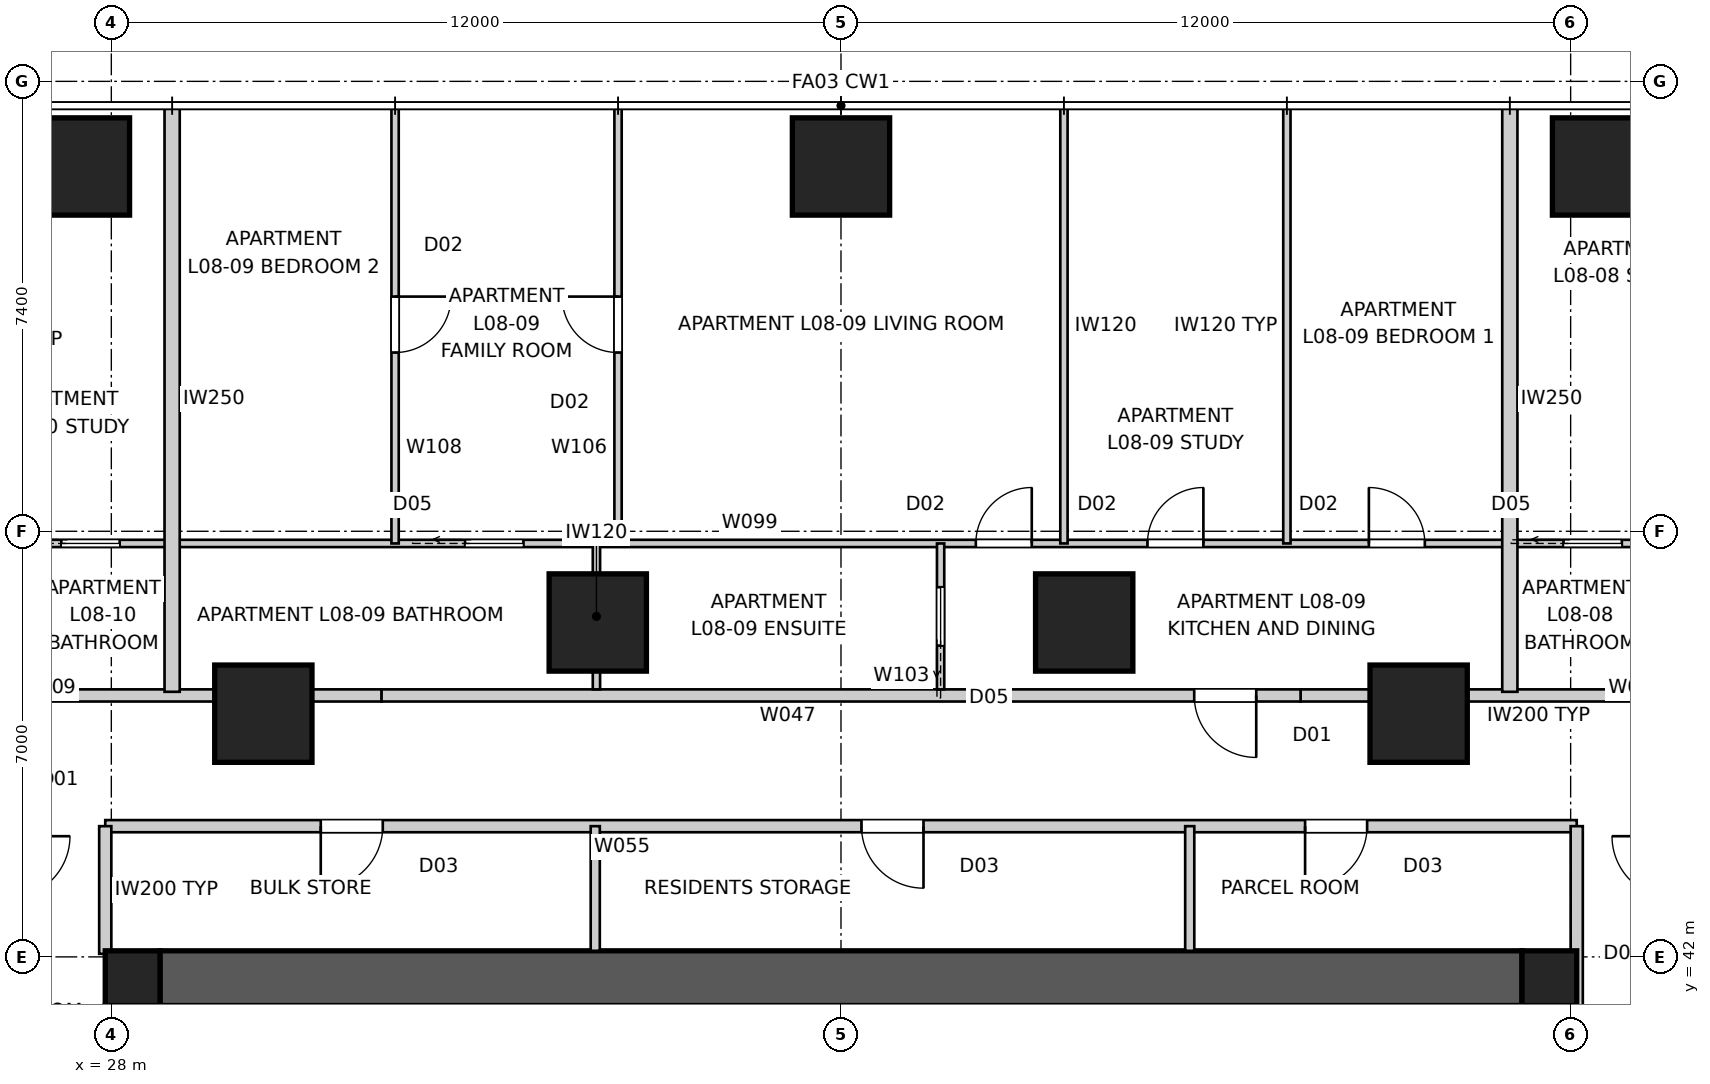
"""IFC4 building model, lengths in metres.
Left out: names, types, materials, properties, quantities, classifications, styles, units other than length and angle.
Written with IfcOpenShell. Run it as: python <this file> out.ifc"""

import sys

from ifc_helpers import new_model, si_unit, direction, frame, frame_2d, origin, origin_2d, place, context, subcontext, project, spatial, polyline, rectangle, outline, extrude, element, fill, save


model = new_model("IFC4")
c1 = context("Model", 3, precision=1e-05, world=origin(), true_north=direction((0.0, 1.0)))
c2 = subcontext(c1, "Body", "Model", "MODEL_VIEW")
j1 = project(units=[si_unit("LENGTHUNIT", "METRE"), si_unit("PLANEANGLEUNIT", "RADIAN")], contexts=[c1])
p1 = place(None, origin())
s1 = spatial("IfcSite", under=j1, at=p1, CompositionType="ELEMENT")
p2 = place(p1, origin())
s2 = spatial("IfcBuilding", under=s1, at=p2, CompositionType="ELEMENT")
p3 = place(p2, frame((0.0, 0.0, 32.0)))
s3 = spatial("IfcBuildingStorey", under=s2, at=p3, CompositionType="ELEMENT", Elevation=32.0)
p4 = place(p3, frame((28.8, 41.65, 0.0), z_axis=(0.0, 0.0, 1.0), x_axis=(1.0, 0.0, 0.0)))
e1 = element("IfcWall", 1, at=p4, inside=s3, PredefinedType="SHEAR", context=c2, shape_type="SweptSolid", body=[
    extrude(outline(polyline([(0.0, -0.45), (22.4, -0.45), (22.4, -0.025), (22.85, -0.025), (22.85, 0.025), (22.4, 0.025), (22.4, 0.45), (0.0, 0.45), (0.0, 0.025), (-0.45, 0.025), (-0.45, -0.025), (0.0, -0.025), (0.0, -0.45)])), origin(), (0.0, 0.0, 1.0), 3.4),
])
p5 = place(p3, frame((51.65, 18.8, 0.0), z_axis=(0.0, 0.0, 1.0), x_axis=(0.0, 1.0, 0.0)))
e2 = element("IfcWall", 2, at=p5, inside=s3, PredefinedType="SHEAR", context=c2, shape_type="SweptSolid", body=[
    extrude(outline(polyline([(0.0, -0.45), (22.4, -0.45), (22.4, -0.025), (22.85, -0.025), (22.85, 0.025), (22.4, 0.025), (22.4, 0.45), (0.0, 0.45), (0.0, 0.025), (-0.45, 0.025), (-0.45, -0.025), (0.0, -0.025), (0.0, -0.45)])), origin(), (0.0, 0.0, 1.0), 3.4),
])
p6 = place(p5, frame((11.14, 0.0, 0.0)))
e3 = element("IfcOpeningElement", 3, at=p6, cuts=e2, PredefinedType="OPENING", context=c2, shape_type="SweptSolid", body=[
    extrude(rectangle(XDim=1.02, YDim=2.4, at=frame_2d((0.51, 1.2))), frame((0.0, 0.46, 0.0), z_axis=(0.0, -1.0, 0.0), x_axis=(1.0, 0.0, 0.0)), (0.0, 0.0, 1.0), 0.92),
])
p7 = place(p3, frame((28.35, 41.2, 0.0), z_axis=(0.0, 0.0, 1.0), x_axis=(0.0, -1.0, 0.0)))
e4 = element("IfcWall", 4, at=p7, inside=s3, PredefinedType="SHEAR", context=c2, shape_type="SweptSolid", body=[
    extrude(outline(polyline([(0.0, -0.45), (22.4, -0.45), (22.4, -0.025), (22.85, -0.025), (22.85, 0.025), (22.4, 0.025), (22.4, 0.45), (0.0, 0.45), (0.0, 0.025), (-0.45, 0.025), (-0.45, -0.025), (0.0, -0.025), (0.0, -0.45)])), origin(), (0.0, 0.0, 1.0), 3.4),
])
p8 = place(p7, frame((11.14, 0.0, 0.0)))
e5 = element("IfcOpeningElement", 5, at=p8, cuts=e4, PredefinedType="OPENING", context=c2, shape_type="SweptSolid", body=[
    extrude(rectangle(XDim=1.02, YDim=2.4, at=frame_2d((0.51, 1.2))), frame((0.0, 0.46, 0.0), z_axis=(0.0, -1.0, 0.0), x_axis=(1.0, 0.0, 0.0)), (0.0, 0.0, 1.0), 0.92),
])
for number, where, z_axis, x_axis in (
    (6, (51.65, 41.65, 0.0), (0.0, 0.0, 1.0), (1.0, 0.0, 0.0)),
    (7, (28.35, 41.65, 0.0), (0.0, 0.0, 1.0), (1.0, 0.0, 0.0)),
):
    element("IfcColumn", number, at=place(p3, frame(where, z_axis=z_axis, x_axis=x_axis)), inside=s3, PredefinedType="COLUMN", context=c2, shape_type="SweptSolid", body=[
        extrude(rectangle(XDim=0.9, YDim=0.9, at=origin_2d()), origin(), (0.0, 0.0, 1.0), 3.4),
    ])
for number, where, z_axis, x_axis in (
    (8, (52.5, 55.0, 0.0), (0.0, 0.0, 1.0), (1.0, 0.0, 0.0)),
    (9, (40.0, 55.0, 0.0), (0.0, 0.0, 1.0), (1.0, 0.0, 0.0)),
    (10, (27.5, 55.0, 0.0), (0.0, 0.0, 1.0), (1.0, 0.0, 0.0)),
    (11, (49.5, 46.0, 0.0), (0.0, 0.0, 1.0), (1.0, 0.0, 0.0)),
    (12, (44.0, 47.5, 0.0), (0.0, 0.0, 1.0), (1.0, 0.0, 0.0)),
    (13, (36.0, 47.5, 0.0), (0.0, 0.0, 1.0), (1.0, 0.0, 0.0)),
    (14, (30.5, 46.0, 0.0), (0.0, 0.0, 1.0), (1.0, 0.0, 0.0)),
):
    element("IfcColumn", number, at=place(p3, frame(where, z_axis=z_axis, x_axis=x_axis)), inside=s3, PredefinedType="COLUMN", context=c2, shape_type="SweptSolid", body=[
        extrude(rectangle(XDim=1.6, YDim=1.6, at=origin_2d()), origin(), (0.0, 0.0, 1.0), 3.4),
    ])
p9 = place(p3, frame((53.7, 46.3, 0.0), z_axis=(0.0, 0.0, 1.0), x_axis=(-1.0, 0.0, 0.0)))
e15 = element("IfcWall", 15, at=p9, inside=s3, PredefinedType="PARTITIONING", context=c2, shape_type="SweptSolid", body=[
    extrude(rectangle(XDim=4.458, YDim=0.2, at=frame_2d((2.229, 0.0))), origin(), (0.0, 0.0, 1.0), 3.25),
])
p10 = place(p3, frame((49.242, 46.3, 0.0), z_axis=(0.0, 0.0, 1.0), x_axis=(-1.0, 0.0, 0.0)))
e16 = element("IfcWall", 16, at=p10, inside=s3, PredefinedType="PARTITIONING", context=c2, shape_type="SweptSolid", body=[
    extrude(rectangle(XDim=1.683, YDim=0.2, at=frame_2d((0.842, 0.0))), origin(), (0.0, 0.0, 1.0), 2.55),
])
p11 = place(p3, frame((47.558, 46.3, 0.0), z_axis=(0.0, 0.0, 1.0), x_axis=(-1.0, 0.0, 0.0)))
e17 = element("IfcWall", 17, at=p11, inside=s3, PredefinedType="PARTITIONING", context=c2, shape_type="SweptSolid", body=[
    extrude(rectangle(XDim=15.117, YDim=0.2, at=frame_2d((7.558, 0.0))), origin(), (0.0, 0.0, 1.0), 3.25),
])
p12 = place(p11, frame((0.729, 0.0, 0.0)))
e18 = element("IfcOpeningElement", 18, at=p12, cuts=e17, PredefinedType="OPENING", context=c2, shape_type="SweptSolid", body=[
    extrude(rectangle(XDim=1.02, YDim=2.34, at=frame_2d((0.51, 1.17))), frame((0.0, 0.11, 0.0), z_axis=(0.0, -1.0, 0.0), x_axis=(1.0, 0.0, 0.0)), (0.0, 0.0, 1.0), 0.22),
])
p13 = place(p3, frame((32.442, 46.3, 0.0), z_axis=(0.0, 0.0, 1.0), x_axis=(-1.0, 0.0, 0.0)))
e19 = element("IfcWall", 19, at=p13, inside=s3, PredefinedType="PARTITIONING", context=c2, shape_type="SweptSolid", body=[
    extrude(rectangle(XDim=1.683, YDim=0.2, at=frame_2d((0.842, 0.0))), origin(), (0.0, 0.0, 1.0), 2.55),
])
p14 = place(p3, frame((30.758, 46.3, 0.0), z_axis=(0.0, 0.0, 1.0), x_axis=(-1.0, 0.0, 0.0)))
e20 = element("IfcWall", 20, at=p14, inside=s3, PredefinedType="PARTITIONING", context=c2, shape_type="SweptSolid", body=[
    extrude(rectangle(XDim=4.458, YDim=0.2, at=frame_2d((2.229, 0.0))), origin(), (0.0, 0.0, 1.0), 3.25),
])
for number, where, z_axis, x_axis in (
    (21, (51.0, 56.0, 0.0), (0.0, 0.0, 1.0), (0.0, -1.0, 0.0)),
    (22, (29.0, 56.0, 0.0), (0.0, 0.0, 1.0), (0.0, -1.0, 0.0)),
):
    element("IfcWall", number, at=place(p3, frame(where, z_axis=z_axis, x_axis=x_axis)), inside=s3, PredefinedType="PARTITIONING", context=c2, shape_type="SweptSolid", body=[
        extrude(rectangle(XDim=9.64, YDim=0.25, at=frame_2d((4.82, 0.0))), origin(), (0.0, 0.0, 1.0), 3.25),
    ])
p15 = place(p3, frame((52.1, 44.15, 0.0), z_axis=(0.0, 0.0, 1.0), x_axis=(-1.0, 0.0, 0.0)))
e23 = element("IfcWall", 23, at=p15, inside=s3, PredefinedType="PARTITIONING", context=c2, shape_type="SweptSolid", body=[
    extrude(rectangle(XDim=24.2, YDim=0.2, at=frame_2d((12.1, 0.0))), origin(), (0.0, 0.0, 1.0), 3.25),
])
p16 = place(p15, frame((10.743, 0.0, 0.0)))
e24 = element("IfcOpeningElement", 24, at=p16, cuts=e23, PredefinedType="OPENING", context=c2, shape_type="SweptSolid", body=[
    extrude(rectangle(XDim=1.02, YDim=2.1, at=frame_2d((0.51, 1.05))), frame((0.0, 0.11, 0.0), z_axis=(0.0, -1.0, 0.0), x_axis=(1.0, 0.0, 0.0)), (0.0, 0.0, 1.0), 0.22),
])
p17 = place(p15, frame((19.636, 0.0, 0.0)))
e25 = element("IfcOpeningElement", 25, at=p17, cuts=e23, PredefinedType="OPENING", context=c2, shape_type="SweptSolid", body=[
    extrude(rectangle(XDim=1.02, YDim=2.1, at=frame_2d((0.51, 1.05))), frame((0.0, 0.11, 0.0), z_axis=(0.0, -1.0, 0.0), x_axis=(1.0, 0.0, 0.0)), (0.0, 0.0, 1.0), 0.22),
])
p18 = place(p15, frame((3.447, 0.0, 0.0)))
e26 = element("IfcOpeningElement", 26, at=p18, cuts=e23, PredefinedType="OPENING", context=c2, shape_type="SweptSolid", body=[
    extrude(rectangle(XDim=1.02, YDim=2.1, at=frame_2d((0.51, 1.05))), frame((0.0, 0.11, 0.0), z_axis=(0.0, -1.0, 0.0), x_axis=(1.0, 0.0, 0.0)), (0.0, 0.0, 1.0), 0.22),
])
p19 = place(p3, frame((27.9, 44.15, 0.0), z_axis=(0.0, 0.0, 1.0), x_axis=(0.0, -1.0, 0.0)))
e27 = element("IfcWall", 27, at=p19, inside=s3, PredefinedType="PARTITIONING", context=c2, shape_type="SweptSolid", body=[
    extrude(rectangle(XDim=2.1, YDim=0.2, at=frame_2d((1.05, 0.0))), origin(), (0.0, 0.0, 1.0), 3.25),
])
p20 = place(p3, frame((52.1, 41.18, 0.0), z_axis=(0.0, 0.0, 1.0), x_axis=(0.0, 1.0, 0.0)))
e28 = element("IfcWall", 28, at=p20, inside=s3, PredefinedType="PARTITIONING", context=c2, shape_type="SweptSolid", body=[
    extrude(rectangle(XDim=2.97, YDim=0.2, at=frame_2d((1.485, 0.0))), origin(), (0.0, 0.0, 1.0), 3.25),
])
p21 = place(p3, frame((35.958, 42.1, 0.0), z_axis=(0.0, 0.0, 1.0), x_axis=(0.0, 1.0, 0.0)))
e29 = element("IfcWall", 29, at=p21, inside=s3, PredefinedType="SOLIDWALL", context=c2, shape_type="SweptSolid", body=[
    extrude(rectangle(XDim=2.05, YDim=0.15, at=frame_2d((1.025, 0.0))), origin(), (0.0, 0.0, 1.0), 3.25),
])
p22 = place(p3, frame((45.735, 42.1, 0.0), z_axis=(0.0, 0.0, 1.0), x_axis=(0.0, 1.0, 0.0)))
e30 = element("IfcWall", 30, at=p22, inside=s3, PredefinedType="SOLIDWALL", context=c2, shape_type="SweptSolid", body=[
    extrude(rectangle(XDim=2.05, YDim=0.15, at=frame_2d((1.025, 0.0))), origin(), (0.0, 0.0, 1.0), 2.796),
])
p23 = place(p3, frame((26.315, 48.8, 0.0), z_axis=(0.0, 0.0, 1.0), x_axis=(1.0, 0.0, 0.0)))
e31 = element("IfcWall", 31, at=p23, inside=s3, PredefinedType="PARTITIONING", context=c2, shape_type="SweptSolid", body=[
    extrude(rectangle(XDim=27.41, YDim=0.12, at=frame_2d((13.705, 0.0))), origin(), (0.0, 0.0, 1.0), 3.25),
])
p24 = place(p23, frame((18.725, 0.0, 0.0)))
e32 = element("IfcOpeningElement", 32, at=p24, cuts=e31, PredefinedType="OPENING", context=c2, shape_type="SweptSolid", body=[
    extrude(rectangle(XDim=0.92, YDim=2.34, at=frame_2d((0.46, 1.17))), frame((0.0, 0.07, 0.0), z_axis=(0.0, -1.0, 0.0), x_axis=(1.0, 0.0, 0.0)), (0.0, 0.0, 1.0), 0.14),
])
p25 = place(p23, frame((22.367, 0.0, 0.0)))
e33 = element("IfcOpeningElement", 33, at=p25, cuts=e31, PredefinedType="OPENING", context=c2, shape_type="SweptSolid", body=[
    extrude(rectangle(XDim=0.92, YDim=2.34, at=frame_2d((0.46, 1.17))), frame((0.0, 0.07, 0.0), z_axis=(0.0, -1.0, 0.0), x_axis=(1.0, 0.0, 0.0)), (0.0, 0.0, 1.0), 0.14),
])
p26 = place(p23, frame((15.903, 0.0, 0.0)))
e34 = element("IfcOpeningElement", 34, at=p26, cuts=e31, PredefinedType="OPENING", context=c2, shape_type="SweptSolid", body=[
    extrude(rectangle(XDim=0.92, YDim=2.34, at=frame_2d((0.46, 1.17))), frame((0.0, 0.07, 0.0), z_axis=(0.0, -1.0, 0.0), x_axis=(1.0, 0.0, 0.0)), (0.0, 0.0, 1.0), 0.14),
])
p27 = place(p23, frame((25.567, 0.0, 0.0)))
e35 = element("IfcOpeningElement", 35, at=p27, cuts=e31, PredefinedType="OPENING", context=c2, shape_type="SweptSolid", body=[
    extrude(rectangle(XDim=0.96, YDim=2.1, at=frame_2d((0.48, 1.05))), frame((0.0, 0.07, 0.0), z_axis=(0.0, -1.0, 0.0), x_axis=(1.0, 0.0, 0.0)), (0.0, 0.0, 1.0), 0.14),
])
p28 = place(p23, frame((0.863, 0.0, 0.0)))
e36 = element("IfcOpeningElement", 36, at=p28, cuts=e31, PredefinedType="OPENING", context=c2, shape_type="SweptSolid", body=[
    extrude(rectangle(XDim=0.96, YDim=2.1, at=frame_2d((0.48, 1.05))), frame((0.0, 0.07, 0.0), z_axis=(0.0, -1.0, 0.0), x_axis=(1.0, 0.0, 0.0)), (0.0, 0.0, 1.0), 0.14),
])
p29 = place(p23, frame((7.503, 0.0, 0.0)))
e37 = element("IfcOpeningElement", 37, at=p29, cuts=e31, PredefinedType="OPENING", context=c2, shape_type="SweptSolid", body=[
    extrude(rectangle(XDim=0.96, YDim=2.1, at=frame_2d((0.48, 1.05))), frame((0.0, 0.07, 0.0), z_axis=(0.0, -1.0, 0.0), x_axis=(1.0, 0.0, 0.0)), (0.0, 0.0, 1.0), 0.14),
])
p30 = place(p3, frame((41.638, 46.4, 0.0), z_axis=(0.0, 0.0, 1.0), x_axis=(0.0, 1.0, 0.0)))
e38 = element("IfcWall", 38, at=p30, inside=s3, PredefinedType="PARTITIONING", context=c2, shape_type="SweptSolid", body=[
    extrude(rectangle(XDim=2.4, YDim=0.12, at=frame_2d((1.2, 0.0))), origin(), (0.0, 0.0, 1.0), 3.25),
])
p31 = place(p30, frame((0.72, 0.0, 0.0)))
e39 = element("IfcOpeningElement", 39, at=p31, cuts=e38, PredefinedType="OPENING", context=c2, shape_type="SweptSolid", body=[
    extrude(rectangle(XDim=0.96, YDim=2.1, at=frame_2d((0.48, 1.05))), frame((0.0, 0.07, 0.0), z_axis=(0.0, -1.0, 0.0), x_axis=(1.0, 0.0, 0.0)), (0.0, 0.0, 1.0), 0.14),
])
p32 = place(p3, frame((35.978, 48.8, 0.0), z_axis=(0.0, 0.0, 1.0), x_axis=(0.0, -1.0, 0.0)))
e40 = element("IfcWall", 40, at=p32, inside=s3, PredefinedType="PARTITIONING", context=c2, shape_type="SweptSolid", body=[
    extrude(rectangle(XDim=2.4, YDim=0.12, at=frame_2d((1.2, 0.0))), origin(), (0.0, 0.0, 1.0), 3.25),
])
p33 = place(p3, frame((43.667, 55.96, 0.0), z_axis=(0.0, 0.0, 1.0), x_axis=(0.0, -1.0, 0.0)))
e41 = element("IfcWall", 41, at=p33, inside=s3, PredefinedType="PARTITIONING", context=c2, shape_type="SweptSolid", body=[
    extrude(rectangle(XDim=7.16, YDim=0.12, at=frame_2d((3.58, 0.0))), origin(), (0.0, 0.0, 1.0), 3.25),
])
p34 = place(p3, frame((36.333, 48.8, 0.0), z_axis=(0.0, 0.0, 1.0), x_axis=(0.0, 1.0, 0.0)))
e42 = element("IfcWall", 42, at=p34, inside=s3, PredefinedType="PARTITIONING", context=c2, shape_type="SweptSolid", body=[
    extrude(rectangle(XDim=7.16, YDim=0.12, at=frame_2d((3.58, 0.0))), origin(), (0.0, 0.0, 1.0), 3.25),
])
p35 = place(p34, frame((3.14, 0.0, 0.0)))
e43 = element("IfcOpeningElement", 43, at=p35, cuts=e42, PredefinedType="OPENING", context=c2, shape_type="SweptSolid", body=[
    extrude(rectangle(XDim=0.92, YDim=2.34, at=frame_2d((0.46, 1.17))), frame((0.0, 0.07, 0.0), z_axis=(0.0, -1.0, 0.0), x_axis=(1.0, 0.0, 0.0)), (0.0, 0.0, 1.0), 0.14),
])
p36 = place(p3, frame((47.333, 48.8, 0.0), z_axis=(0.0, 0.0, 1.0), x_axis=(0.0, 1.0, 0.0)))
e44 = element("IfcWall", 44, at=p36, inside=s3, PredefinedType="PARTITIONING", context=c2, shape_type="SweptSolid", body=[
    extrude(rectangle(XDim=7.16, YDim=0.12, at=frame_2d((3.58, 0.0))), origin(), (0.0, 0.0, 1.0), 3.25),
])
p37 = place(p3, frame((32.667, 55.96, 0.0), z_axis=(0.0, 0.0, 1.0), x_axis=(0.0, -1.0, 0.0)))
e45 = element("IfcWall", 45, at=p37, inside=s3, PredefinedType="PARTITIONING", context=c2, shape_type="SweptSolid", body=[
    extrude(rectangle(XDim=7.16, YDim=0.12, at=frame_2d((3.58, 0.0))), origin(), (0.0, 0.0, 1.0), 3.25),
])
p38 = place(p37, frame((3.1, 0.0, 0.0)))
e46 = element("IfcOpeningElement", 46, at=p38, cuts=e45, PredefinedType="OPENING", context=c2, shape_type="SweptSolid", body=[
    extrude(rectangle(XDim=0.92, YDim=2.34, at=frame_2d((0.46, 1.17))), frame((0.0, 0.07, 0.0), z_axis=(0.0, -1.0, 0.0), x_axis=(1.0, 0.0, 0.0)), (0.0, 0.0, 1.0), 0.14),
])
p39 = place(p16, origin())
e47 = element("IfcDoor", 47, at=p39, inside=s3, OperationType="SINGLE_SWING_LEFT", PredefinedType="DOOR", context=c2, shape_type="SweptSolid", body=[
    extrude(rectangle(XDim=1.02, YDim=2.1, at=frame_2d((0.51, 1.05))), frame((0.0, 0.025, 0.0), z_axis=(0.0, -1.0, 0.0), x_axis=(1.0, 0.0, 0.0)), (0.0, 0.0, 1.0), 0.05),
])
fill(e24, e47)
p40 = place(p12, origin())
e48 = element("IfcDoor", 48, at=p40, inside=s3, OperationType="SINGLE_SWING_LEFT", PredefinedType="DOOR", context=c2, shape_type="SweptSolid", body=[
    extrude(rectangle(XDim=1.02, YDim=2.34, at=frame_2d((0.51, 1.17))), frame((0.0, 0.025, 0.0), z_axis=(0.0, -1.0, 0.0), x_axis=(1.0, 0.0, 0.0)), (0.0, 0.0, 1.0), 0.05),
])
fill(e18, e48)
p41 = place(p17, origin())
e49 = element("IfcDoor", 49, at=p41, inside=s3, OperationType="SINGLE_SWING_RIGHT", PredefinedType="DOOR", context=c2, shape_type="SweptSolid", body=[
    extrude(rectangle(XDim=1.02, YDim=2.1, at=frame_2d((0.51, 1.05))), frame((0.0, 0.025, 0.0), z_axis=(0.0, -1.0, 0.0), x_axis=(1.0, 0.0, 0.0)), (0.0, 0.0, 1.0), 0.05),
])
fill(e25, e49)
p42 = place(p18, origin())
e50 = element("IfcDoor", 50, at=p42, inside=s3, OperationType="SINGLE_SWING_RIGHT", PredefinedType="DOOR", context=c2, shape_type="SweptSolid", body=[
    extrude(rectangle(XDim=1.02, YDim=2.1, at=frame_2d((0.51, 1.05))), frame((0.0, 0.025, 0.0), z_axis=(0.0, -1.0, 0.0), x_axis=(1.0, 0.0, 0.0)), (0.0, 0.0, 1.0), 0.05),
])
fill(e26, e50)
p43 = place(p24, origin())
e51 = element("IfcDoor", 51, at=p43, inside=s3, OperationType="SINGLE_SWING_RIGHT", PredefinedType="DOOR", context=c2, shape_type="SweptSolid", body=[
    extrude(rectangle(XDim=0.92, YDim=2.34, at=frame_2d((0.46, 1.17))), frame((0.0, 0.025, 0.0), z_axis=(0.0, -1.0, 0.0), x_axis=(1.0, 0.0, 0.0)), (0.0, 0.0, 1.0), 0.05),
])
fill(e32, e51)
p44 = place(p25, origin())
e52 = element("IfcDoor", 52, at=p44, inside=s3, OperationType="SINGLE_SWING_LEFT", PredefinedType="DOOR", context=c2, shape_type="SweptSolid", body=[
    extrude(rectangle(XDim=0.92, YDim=2.34, at=frame_2d((0.46, 1.17))), frame((0.0, 0.025, 0.0), z_axis=(0.0, -1.0, 0.0), x_axis=(1.0, 0.0, 0.0)), (0.0, 0.0, 1.0), 0.05),
])
fill(e33, e52)
p45 = place(p31, origin())
e53 = element("IfcDoor", 53, at=p45, inside=s3, OperationType="SLIDING_TO_LEFT", PredefinedType="DOOR", context=c2, shape_type="SweptSolid", body=[
    extrude(rectangle(XDim=0.96, YDim=2.1, at=frame_2d((0.48, 1.05))), frame((0.0, 0.025, 0.0), z_axis=(0.0, -1.0, 0.0), x_axis=(1.0, 0.0, 0.0)), (0.0, 0.0, 1.0), 0.05),
])
fill(e39, e53)
p46 = place(p26, origin())
e54 = element("IfcDoor", 54, at=p46, inside=s3, OperationType="SINGLE_SWING_RIGHT", PredefinedType="DOOR", context=c2, shape_type="SweptSolid", body=[
    extrude(rectangle(XDim=0.92, YDim=2.34, at=frame_2d((0.46, 1.17))), frame((0.0, 0.025, 0.0), z_axis=(0.0, -1.0, 0.0), x_axis=(1.0, 0.0, 0.0)), (0.0, 0.0, 1.0), 0.05),
])
fill(e34, e54)
p47 = place(p35, origin())
e55 = element("IfcDoor", 55, at=p47, inside=s3, OperationType="SINGLE_SWING_RIGHT", PredefinedType="DOOR", context=c2, shape_type="SweptSolid", body=[
    extrude(rectangle(XDim=0.92, YDim=2.34, at=frame_2d((0.46, 1.17))), frame((0.0, 0.025, 0.0), z_axis=(0.0, -1.0, 0.0), x_axis=(1.0, 0.0, 0.0)), (0.0, 0.0, 1.0), 0.05),
])
fill(e43, e55)
p48 = place(p27, origin())
e56 = element("IfcDoor", 56, at=p48, inside=s3, OperationType="SLIDING_TO_LEFT", PredefinedType="DOOR", context=c2, shape_type="SweptSolid", body=[
    extrude(rectangle(XDim=0.96, YDim=2.1, at=frame_2d((0.48, 1.05))), frame((0.0, 0.025, 0.0), z_axis=(0.0, -1.0, 0.0), x_axis=(1.0, 0.0, 0.0)), (0.0, 0.0, 1.0), 0.05),
])
fill(e35, e56)
p49 = place(p28, origin())
e57 = element("IfcDoor", 57, at=p49, inside=s3, OperationType="SLIDING_TO_LEFT", PredefinedType="DOOR", context=c2, shape_type="SweptSolid", body=[
    extrude(rectangle(XDim=0.96, YDim=2.1, at=frame_2d((0.48, 1.05))), frame((0.0, 0.025, 0.0), z_axis=(0.0, -1.0, 0.0), x_axis=(1.0, 0.0, 0.0)), (0.0, 0.0, 1.0), 0.05),
])
fill(e36, e57)
p50 = place(p38, origin())
e58 = element("IfcDoor", 58, at=p50, inside=s3, OperationType="SINGLE_SWING_LEFT", PredefinedType="DOOR", context=c2, shape_type="SweptSolid", body=[
    extrude(rectangle(XDim=0.92, YDim=2.34, at=frame_2d((0.46, 1.17))), frame((0.0, 0.025, 0.0), z_axis=(0.0, -1.0, 0.0), x_axis=(1.0, 0.0, 0.0)), (0.0, 0.0, 1.0), 0.05),
])
fill(e46, e58)
p51 = place(p29, origin())
e59 = element("IfcDoor", 59, at=p51, inside=s3, OperationType="SLIDING_TO_LEFT", PredefinedType="DOOR", context=c2, shape_type="SweptSolid", body=[
    extrude(rectangle(XDim=0.96, YDim=2.1, at=frame_2d((0.48, 1.05))), frame((0.0, 0.025, 0.0), z_axis=(0.0, -1.0, 0.0), x_axis=(1.0, 0.0, 0.0)), (0.0, 0.0, 1.0), 0.05),
])
fill(e37, e59)
save(model, sys.argv[1])
